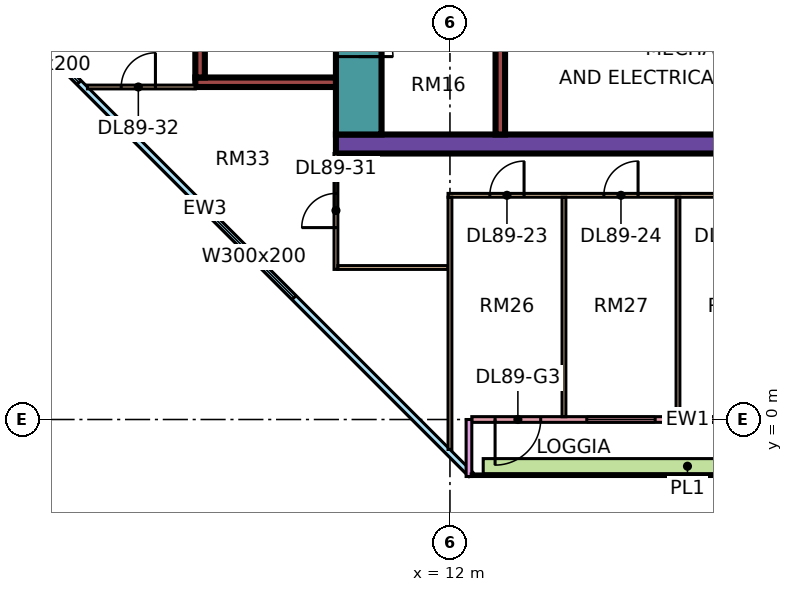
"""IFC4 building model, lengths in metres.
Left out: names, types, materials, properties, quantities, classifications, styles, units other than length and angle.
Written with IfcOpenShell. Run it as: python <this file> out.ifc"""

import sys

from ifc_helpers import new_model, si_unit, direction, frame, frame_2d, origin, place, context, subcontext, project, spatial, rectangle, extrude, element, fill, save


model = new_model("IFC4")
c1 = context("Model", 3, precision=1e-05, world=origin(), true_north=direction((0.0, 1.0)))
c2 = subcontext(c1, "Body", "Model", "MODEL_VIEW")
j1 = project(units=[si_unit("LENGTHUNIT", "METRE"), si_unit("PLANEANGLEUNIT", "RADIAN")], contexts=[c1])
p1 = place(None, origin())
s1 = spatial("IfcSite", under=j1, at=p1, CompositionType="ELEMENT")
p2 = place(p1, origin())
s2 = spatial("IfcBuilding", under=s1, at=p2, CompositionType="ELEMENT")
p3 = place(p2, frame((0.0, 0.0, 380.15)))
s3 = spatial("IfcBuildingStorey", under=s2, at=p3, CompositionType="ELEMENT", Elevation=380.15)
p4 = place(p3, frame((9.0, 7.25, 0.0), z_axis=(0.0, 0.0, 1.0), x_axis=(1.0, 0.0, 0.0)))
e1 = element("IfcWall", 1, at=p4, inside=s3, PredefinedType="SHEAR", context=c2, shape_type="SweptSolid", body=[
    extrude(rectangle(XDim=25.0, YDim=0.5, at=frame_2d((12.5, 0.0))), origin(), (0.0, 0.0, 1.0), 3.75),
])
p5 = place(p3, frame((9.6, 7.5, 0.0), z_axis=(0.0, 0.0, 1.0), x_axis=(0.0, 1.0, 0.0)))
e2 = element("IfcWall", 2, at=p5, inside=s3, PredefinedType="SHEAR", context=c2, shape_type="SweptSolid", body=[
    extrude(rectangle(XDim=12.0, YDim=1.2, at=frame_2d((6.0, 0.0))), origin(), (0.0, 0.0, 1.0), 3.75),
])
p6 = place(p5, frame((4.375, 0.0, 0.0)))
e3 = element("IfcOpeningElement", 3, at=p6, cuts=e2, PredefinedType="OPENING", context=c2, shape_type="SweptSolid", body=[
    extrude(rectangle(XDim=1.1, YDim=2.2, at=frame_2d((0.55, 1.1))), frame((0.0, 0.61, 0.0), z_axis=(0.0, -1.0, 0.0), x_axis=(1.0, 0.0, 0.0)), (0.0, 0.0, 1.0), 1.22),
])
p7 = place(p5, frame((6.875, 0.0, 0.0)))
e4 = element("IfcOpeningElement", 4, at=p7, cuts=e2, PredefinedType="OPENING", context=c2, shape_type="SweptSolid", body=[
    extrude(rectangle(XDim=1.1, YDim=2.2, at=frame_2d((0.55, 1.1))), frame((0.0, 0.61, 0.0), z_axis=(0.0, -1.0, 0.0), x_axis=(1.0, 0.0, 0.0)), (0.0, 0.0, 1.0), 1.22),
])
p8 = place(p5, frame((9.85, 0.0, 0.0)))
e5 = element("IfcOpeningElement", 5, at=p8, cuts=e2, PredefinedType="OPENING", context=c2, shape_type="SweptSolid", body=[
    extrude(rectangle(XDim=1.1, YDim=2.2, at=frame_2d((0.55, 1.1))), frame((0.0, 0.61, 0.0), z_axis=(0.0, -1.0, 0.0), x_axis=(1.0, 0.0, 0.0)), (0.0, 0.0, 1.0), 1.22),
])
p9 = place(p5, frame((2.05, 0.0, 0.0)))
e6 = element("IfcOpeningElement", 6, at=p9, cuts=e2, PredefinedType="OPENING", context=c2, shape_type="SweptSolid", body=[
    extrude(rectangle(XDim=0.9, YDim=2.1, at=frame_2d((0.45, 1.05))), frame((0.0, 0.61, 0.0), z_axis=(0.0, -1.0, 0.0), x_axis=(1.0, 0.0, 0.0)), (0.0, 0.0, 1.0), 1.22),
])
p10 = place(p3, frame((13.325, 7.5, 0.0), z_axis=(0.0, 0.0, 1.0), x_axis=(0.0, 1.0, 0.0)))
e7 = element("IfcWall", 7, at=p10, inside=s3, PredefinedType="SHEAR", context=c2, shape_type="SweptSolid", body=[
    extrude(rectangle(XDim=12.0, YDim=0.25, at=frame_2d((6.0, 0.0))), origin(), (0.0, 0.0, 1.0), 3.75),
])
p11 = place(p3, frame((5.3, 8.875, 0.0), z_axis=(0.0, 0.0, 1.0), x_axis=(1.0, 0.0, 0.0)))
e8 = element("IfcWall", 8, at=p11, inside=s3, PredefinedType="SHEAR", context=c2, shape_type="SweptSolid", body=[
    extrude(rectangle(XDim=3.7, YDim=0.25, at=frame_2d((1.85, 0.0))), origin(), (0.0, 0.0, 1.0), 3.75),
])
p12 = place(p3, frame((5.425, 9.0, 0.0), z_axis=(0.0, 0.0, 1.0), x_axis=(0.0, 1.0, 0.0)))
e9 = element("IfcWall", 9, at=p12, inside=s3, PredefinedType="SHEAR", context=c2, shape_type="SweptSolid", body=[
    extrude(rectangle(XDim=4.0, YDim=0.25, at=frame_2d((2.0, 0.0))), origin(), (0.0, 0.0, 1.0), 3.75),
])
p13 = place(p3, frame((-1.447, 12.553, 0.0), z_axis=(0.0, 0.0, 1.0), x_axis=(0.707106781187, -0.707106781187, 0.0)))
e10 = element("IfcWall", 10, at=p13, inside=s3, PredefinedType="SOLIDWALL", context=c2, shape_type="SweptSolid", body=[
    extrude(rectangle(XDim=19.799, YDim=0.15, at=frame_2d((9.899, 0.0))), origin(), (0.0, 0.0, 1.0), 3.3),
])
p14 = place(p13, frame((2.212, 0.0, 0.45)))
e11 = element("IfcOpeningElement", 11, at=p14, cuts=e10, PredefinedType="OPENING", context=c2, shape_type="SweptSolid", body=[
    extrude(rectangle(XDim=3.0, YDim=2.0, at=frame_2d((1.5, 1.0))), frame((0.0, 0.085, 0.0), z_axis=(0.0, -1.0, 0.0), x_axis=(1.0, 0.0, 0.0)), (0.0, 0.0, 1.0), 0.17),
])
p15 = place(p13, frame((10.216, 0.0, 0.45)))
e12 = element("IfcOpeningElement", 12, at=p15, cuts=e10, PredefinedType="OPENING", context=c2, shape_type="SweptSolid", body=[
    extrude(rectangle(XDim=3.0, YDim=2.0, at=frame_2d((1.5, 1.0))), frame((0.0, 0.085, 0.0), z_axis=(0.0, -1.0, 0.0), x_axis=(1.0, 0.0, 0.0)), (0.0, 0.0, 1.0), 0.17),
])
p16 = place(p3, frame((12.575, 0.0, 0.0), z_axis=(0.0, 0.0, 1.0), x_axis=(1.0, 0.0, 0.0)))
e13 = element("IfcWall", 13, at=p16, inside=s3, PredefinedType="SOLIDWALL", context=c2, shape_type="SweptSolid", body=[
    extrude(rectangle(XDim=11.35, YDim=0.15, at=frame_2d((5.675, 0.0))), origin(), (0.0, 0.0, 1.0), 3.3),
])
p17 = place(p16, frame((0.613, 0.0, 0.0)))
e14 = element("IfcOpeningElement", 14, at=p17, cuts=e13, PredefinedType="OPENING", context=c2, shape_type="SweptSolid", body=[
    extrude(rectangle(XDim=1.2, YDim=2.4, at=frame_2d((0.6, 1.2))), frame((0.0, 0.085, 0.0), z_axis=(0.0, -1.0, 0.0), x_axis=(1.0, 0.0, 0.0)), (0.0, 0.0, 1.0), 0.17),
])
p18 = place(p16, frame((3.025, 0.0, 0.45)))
e15 = element("IfcOpeningElement", 15, at=p18, cuts=e13, PredefinedType="OPENING", context=c2, shape_type="SweptSolid", body=[
    extrude(rectangle(XDim=1.8, YDim=2.0, at=frame_2d((0.9, 1.0))), frame((0.0, 0.085, 0.0), z_axis=(0.0, -1.0, 0.0), x_axis=(1.0, 0.0, 0.0)), (0.0, 0.0, 1.0), 0.17),
])
p19 = place(p16, frame((6.025, 0.0, 0.45)))
e16 = element("IfcOpeningElement", 16, at=p19, cuts=e13, PredefinedType="OPENING", context=c2, shape_type="SweptSolid", body=[
    extrude(rectangle(XDim=1.8, YDim=2.0, at=frame_2d((0.9, 1.0))), frame((0.0, 0.085, 0.0), z_axis=(0.0, -1.0, 0.0), x_axis=(1.0, 0.0, 0.0)), (0.0, 0.0, 1.0), 0.17),
])
p20 = place(p16, frame((8.788, 0.0, 0.45)))
e17 = element("IfcOpeningElement", 17, at=p20, cuts=e13, PredefinedType="OPENING", context=c2, shape_type="SweptSolid", body=[
    extrude(rectangle(XDim=1.8, YDim=2.0, at=frame_2d((0.9, 1.0))), frame((0.0, 0.085, 0.0), z_axis=(0.0, -1.0, 0.0), x_axis=(1.0, 0.0, 0.0)), (0.0, 0.0, 1.0), 0.17),
])
p21 = place(p3, frame((12.5, -1.5, 0.0), z_axis=(0.0, 0.0, 1.0), x_axis=(0.0, 1.0, 0.0)))
e18 = element("IfcWall", 18, at=p21, inside=s3, PredefinedType="SOLIDWALL", context=c2, shape_type="SweptSolid", body=[
    extrude(rectangle(XDim=1.5, YDim=0.15, at=frame_2d((0.75, 0.0))), origin(), (0.0, 0.0, 1.0), 3.3),
])
p22 = place(p3, frame((12.875, -1.229, 0.0), z_axis=(0.0, 0.0, 1.0), x_axis=(1.0, 0.0, 0.0)))
e19 = element("IfcWall", 19, at=p22, inside=s3, PredefinedType="SOLIDWALL", context=c2, shape_type="SweptSolid", body=[
    extrude(rectangle(XDim=10.75, YDim=0.4, at=frame_2d((5.375, 0.0))), origin(), (0.0, 0.0, 1.0), 0.7),
])
p23 = place(p3, frame((2.461, 8.75, 0.0), z_axis=(0.0, 0.0, 1.0), x_axis=(1.0, 0.0, 0.0)))
e20 = element("IfcWall", 20, at=p23, inside=s3, PredefinedType="PARTITIONING", context=c2, shape_type="SweptSolid", body=[
    extrude(rectangle(XDim=2.839, YDim=0.1, at=frame_2d((1.419, 0.0))), origin(), (0.0, 0.0, 1.0), 3.3),
])
p24 = place(p23, frame((0.889, 0.0, 0.0)))
e21 = element("IfcOpeningElement", 21, at=p24, cuts=e20, PredefinedType="OPENING", context=c2, shape_type="SweptSolid", body=[
    extrude(rectangle(XDim=0.9, YDim=2.1, at=frame_2d((0.45, 1.05))), frame((0.0, 0.06, 0.0), z_axis=(0.0, -1.0, 0.0), x_axis=(1.0, 0.0, 0.0)), (0.0, 0.0, 1.0), 0.12),
])
p25 = place(p3, frame((9.0, 3.95, 0.0), z_axis=(0.0, 0.0, 1.0), x_axis=(0.0, 1.0, 0.0)))
e22 = element("IfcWall", 22, at=p25, inside=s3, PredefinedType="PARTITIONING", context=c2, shape_type="SweptSolid", body=[
    extrude(rectangle(XDim=3.05, YDim=0.1, at=frame_2d((1.525, 0.0))), origin(), (0.0, 0.0, 1.0), 3.3),
])
p26 = place(p25, frame((1.1, 0.0, 0.0)))
e23 = element("IfcOpeningElement", 23, at=p26, cuts=e22, PredefinedType="OPENING", context=c2, shape_type="SweptSolid", body=[
    extrude(rectangle(XDim=0.9, YDim=2.1, at=frame_2d((0.45, 1.05))), frame((0.0, 0.06, 0.0), z_axis=(0.0, -1.0, 0.0), x_axis=(1.0, 0.0, 0.0)), (0.0, 0.0, 1.0), 0.12),
])
p27 = place(p3, frame((9.05, 4.0, 0.0), z_axis=(0.0, 0.0, 1.0), x_axis=(1.0, 0.0, 0.0)))
e24 = element("IfcWall", 24, at=p27, inside=s3, PredefinedType="PARTITIONING", context=c2, shape_type="SweptSolid", body=[
    extrude(rectangle(XDim=2.9, YDim=0.1, at=frame_2d((1.45, 0.0))), origin(), (0.0, 0.0, 1.0), 3.3),
])
p28 = place(p3, frame((11.95, 5.9, 0.0), z_axis=(0.0, 0.0, 1.0), x_axis=(1.0, 0.0, 0.0)))
e25 = element("IfcWall", 25, at=p28, inside=s3, PredefinedType="PARTITIONING", context=c2, shape_type="SweptSolid", body=[
    extrude(rectangle(XDim=21.1, YDim=0.1, at=frame_2d((10.55, 0.0))), origin(), (0.0, 0.0, 1.0), 3.3),
])
p29 = place(p28, frame((1.1, 0.0, 0.0)))
e26 = element("IfcOpeningElement", 26, at=p29, cuts=e25, PredefinedType="OPENING", context=c2, shape_type="SweptSolid", body=[
    extrude(rectangle(XDim=0.9, YDim=2.1, at=frame_2d((0.45, 1.05))), frame((0.0, 0.06, 0.0), z_axis=(0.0, -1.0, 0.0), x_axis=(1.0, 0.0, 0.0)), (0.0, 0.0, 1.0), 0.12),
])
p30 = place(p28, frame((4.1, 0.0, 0.0)))
e27 = element("IfcOpeningElement", 27, at=p30, cuts=e25, PredefinedType="OPENING", context=c2, shape_type="SweptSolid", body=[
    extrude(rectangle(XDim=0.9, YDim=2.1, at=frame_2d((0.45, 1.05))), frame((0.0, 0.06, 0.0), z_axis=(0.0, -1.0, 0.0), x_axis=(1.0, 0.0, 0.0)), (0.0, 0.0, 1.0), 0.12),
])
p31 = place(p28, frame((7.1, 0.0, 0.0)))
e28 = element("IfcOpeningElement", 28, at=p31, cuts=e25, PredefinedType="OPENING", context=c2, shape_type="SweptSolid", body=[
    extrude(rectangle(XDim=0.9, YDim=2.1, at=frame_2d((0.45, 1.05))), frame((0.0, 0.06, 0.0), z_axis=(0.0, -1.0, 0.0), x_axis=(1.0, 0.0, 0.0)), (0.0, 0.0, 1.0), 0.12),
])
p32 = place(p28, frame((10.1, 0.0, 0.0)))
e29 = element("IfcOpeningElement", 29, at=p32, cuts=e25, PredefinedType="OPENING", context=c2, shape_type="SweptSolid", body=[
    extrude(rectangle(XDim=0.9, YDim=2.1, at=frame_2d((0.45, 1.05))), frame((0.0, 0.06, 0.0), z_axis=(0.0, -1.0, 0.0), x_axis=(1.0, 0.0, 0.0)), (0.0, 0.0, 1.0), 0.12),
])
p33 = place(p28, frame((16.1, 0.0, 0.0)))
e30 = element("IfcOpeningElement", 30, at=p33, cuts=e25, PredefinedType="OPENING", context=c2, shape_type="SweptSolid", body=[
    extrude(rectangle(XDim=0.9, YDim=2.1, at=frame_2d((0.45, 1.05))), frame((0.0, 0.06, 0.0), z_axis=(0.0, -1.0, 0.0), x_axis=(1.0, 0.0, 0.0)), (0.0, 0.0, 1.0), 0.12),
])
p34 = place(p3, frame((12.0, -0.788, 0.0), z_axis=(0.0, 0.0, 1.0), x_axis=(0.0, 1.0, 0.0)))
e31 = element("IfcWall", 31, at=p34, inside=s3, PredefinedType="PARTITIONING", context=c2, shape_type="SweptSolid", body=[
    extrude(rectangle(XDim=6.638, YDim=0.1, at=frame_2d((3.319, 0.0))), origin(), (0.0, 0.0, 1.0), 3.3),
])
for number, where, z_axis, x_axis in (
    (32, (15.0, 0.074, 0.0), (0.0, 0.0, 1.0), (0.0, 1.0, 0.0)),
    (33, (18.0, 0.074, 0.0), (0.0, 0.0, 1.0), (0.0, 1.0, 0.0)),
):
    element("IfcWall", number, at=place(p3, frame(where, z_axis=z_axis, x_axis=x_axis)), inside=s3, PredefinedType="PARTITIONING", context=c2, shape_type="SweptSolid", body=[
        extrude(rectangle(XDim=5.776, YDim=0.1, at=frame_2d((2.888, 0.0))), origin(), (0.0, 0.0, 1.0), 3.3),
    ])
p35 = place(p14, origin())
e34 = element("IfcWindow", 34, at=p35, inside=s3, PartitioningType="SINGLE_PANEL", PredefinedType="WINDOW", context=c2, shape_type="SweptSolid", body=[
    extrude(rectangle(XDim=3.0, YDim=2.0, at=frame_2d((1.5, 1.0))), frame((0.0, 0.03, 0.0), z_axis=(0.0, -1.0, 0.0), x_axis=(1.0, 0.0, 0.0)), (0.0, 0.0, 1.0), 0.06),
])
fill(e11, e34)
p36 = place(p15, origin())
e35 = element("IfcWindow", 35, at=p36, inside=s3, PartitioningType="SINGLE_PANEL", PredefinedType="WINDOW", context=c2, shape_type="SweptSolid", body=[
    extrude(rectangle(XDim=3.0, YDim=2.0, at=frame_2d((1.5, 1.0))), frame((0.0, 0.03, 0.0), z_axis=(0.0, -1.0, 0.0), x_axis=(1.0, 0.0, 0.0)), (0.0, 0.0, 1.0), 0.06),
])
fill(e12, e35)
p37 = place(p17, frame((1.2, 0.0, 0.0), z_axis=(0.0, 0.0, 1.0), x_axis=(-1.0, 0.0, 0.0)))
e36 = element("IfcDoor", 36, at=p37, inside=s3, OperationType="DOUBLE_DOOR_SINGLE_SWING", PredefinedType="DOOR", context=c2, shape_type="SweptSolid", body=[
    extrude(rectangle(XDim=1.2, YDim=2.4, at=frame_2d((0.6, 1.2))), frame((0.0, 0.025, 0.0), z_axis=(0.0, -1.0, 0.0), x_axis=(1.0, 0.0, 0.0)), (0.0, 0.0, 1.0), 0.05),
])
fill(e14, e36)
p38 = place(p18, origin())
e37 = element("IfcWindow", 37, at=p38, inside=s3, PartitioningType="SINGLE_PANEL", PredefinedType="WINDOW", context=c2, shape_type="SweptSolid", body=[
    extrude(rectangle(XDim=1.8, YDim=2.0, at=frame_2d((0.9, 1.0))), frame((0.0, 0.03, 0.0), z_axis=(0.0, -1.0, 0.0), x_axis=(1.0, 0.0, 0.0)), (0.0, 0.0, 1.0), 0.06),
])
fill(e15, e37)
p39 = place(p19, origin())
e38 = element("IfcWindow", 38, at=p39, inside=s3, PartitioningType="SINGLE_PANEL", PredefinedType="WINDOW", context=c2, shape_type="SweptSolid", body=[
    extrude(rectangle(XDim=1.8, YDim=2.0, at=frame_2d((0.9, 1.0))), frame((0.0, 0.03, 0.0), z_axis=(0.0, -1.0, 0.0), x_axis=(1.0, 0.0, 0.0)), (0.0, 0.0, 1.0), 0.06),
])
fill(e16, e38)
p40 = place(p9, frame((0.9, 0.0, 0.0), z_axis=(0.0, 0.0, 1.0), x_axis=(-1.0, 0.0, 0.0)))
e39 = element("IfcDoor", 39, at=p40, inside=s3, OperationType="SINGLE_SWING_LEFT", PredefinedType="DOOR", context=c2, shape_type="SweptSolid", body=[
    extrude(rectangle(XDim=0.9, YDim=2.1, at=frame_2d((0.45, 1.05))), frame((0.0, 0.025, 0.0), z_axis=(0.0, -1.0, 0.0), x_axis=(1.0, 0.0, 0.0)), (0.0, 0.0, 1.0), 0.05),
])
fill(e6, e39)
p41 = place(p29, frame((0.9, 0.0, 0.0), z_axis=(0.0, 0.0, 1.0), x_axis=(-1.0, 0.0, 0.0)))
e40 = element("IfcDoor", 40, at=p41, inside=s3, OperationType="SINGLE_SWING_RIGHT", PredefinedType="DOOR", context=c2, shape_type="SweptSolid", body=[
    extrude(rectangle(XDim=0.9, YDim=2.1, at=frame_2d((0.45, 1.05))), frame((0.0, 0.025, 0.0), z_axis=(0.0, -1.0, 0.0), x_axis=(1.0, 0.0, 0.0)), (0.0, 0.0, 1.0), 0.05),
])
fill(e26, e40)
p42 = place(p30, frame((0.9, 0.0, 0.0), z_axis=(0.0, 0.0, 1.0), x_axis=(-1.0, 0.0, 0.0)))
e41 = element("IfcDoor", 41, at=p42, inside=s3, OperationType="SINGLE_SWING_RIGHT", PredefinedType="DOOR", context=c2, shape_type="SweptSolid", body=[
    extrude(rectangle(XDim=0.9, YDim=2.1, at=frame_2d((0.45, 1.05))), frame((0.0, 0.025, 0.0), z_axis=(0.0, -1.0, 0.0), x_axis=(1.0, 0.0, 0.0)), (0.0, 0.0, 1.0), 0.05),
])
fill(e27, e41)
p43 = place(p26, origin())
e42 = element("IfcDoor", 42, at=p43, inside=s3, OperationType="SINGLE_SWING_LEFT", PredefinedType="DOOR", context=c2, shape_type="SweptSolid", body=[
    extrude(rectangle(XDim=0.9, YDim=2.1, at=frame_2d((0.45, 1.05))), frame((0.0, 0.025, 0.0), z_axis=(0.0, -1.0, 0.0), x_axis=(1.0, 0.0, 0.0)), (0.0, 0.0, 1.0), 0.05),
])
fill(e23, e42)
p44 = place(p24, frame((0.9, 0.0, 0.0), z_axis=(0.0, 0.0, 1.0), x_axis=(-1.0, 0.0, 0.0)))
e43 = element("IfcDoor", 43, at=p44, inside=s3, OperationType="SINGLE_SWING_RIGHT", PredefinedType="DOOR", context=c2, shape_type="SweptSolid", body=[
    extrude(rectangle(XDim=0.9, YDim=2.1, at=frame_2d((0.45, 1.05))), frame((0.0, 0.025, 0.0), z_axis=(0.0, -1.0, 0.0), x_axis=(1.0, 0.0, 0.0)), (0.0, 0.0, 1.0), 0.05),
])
fill(e21, e43)
save(model, sys.argv[1])
